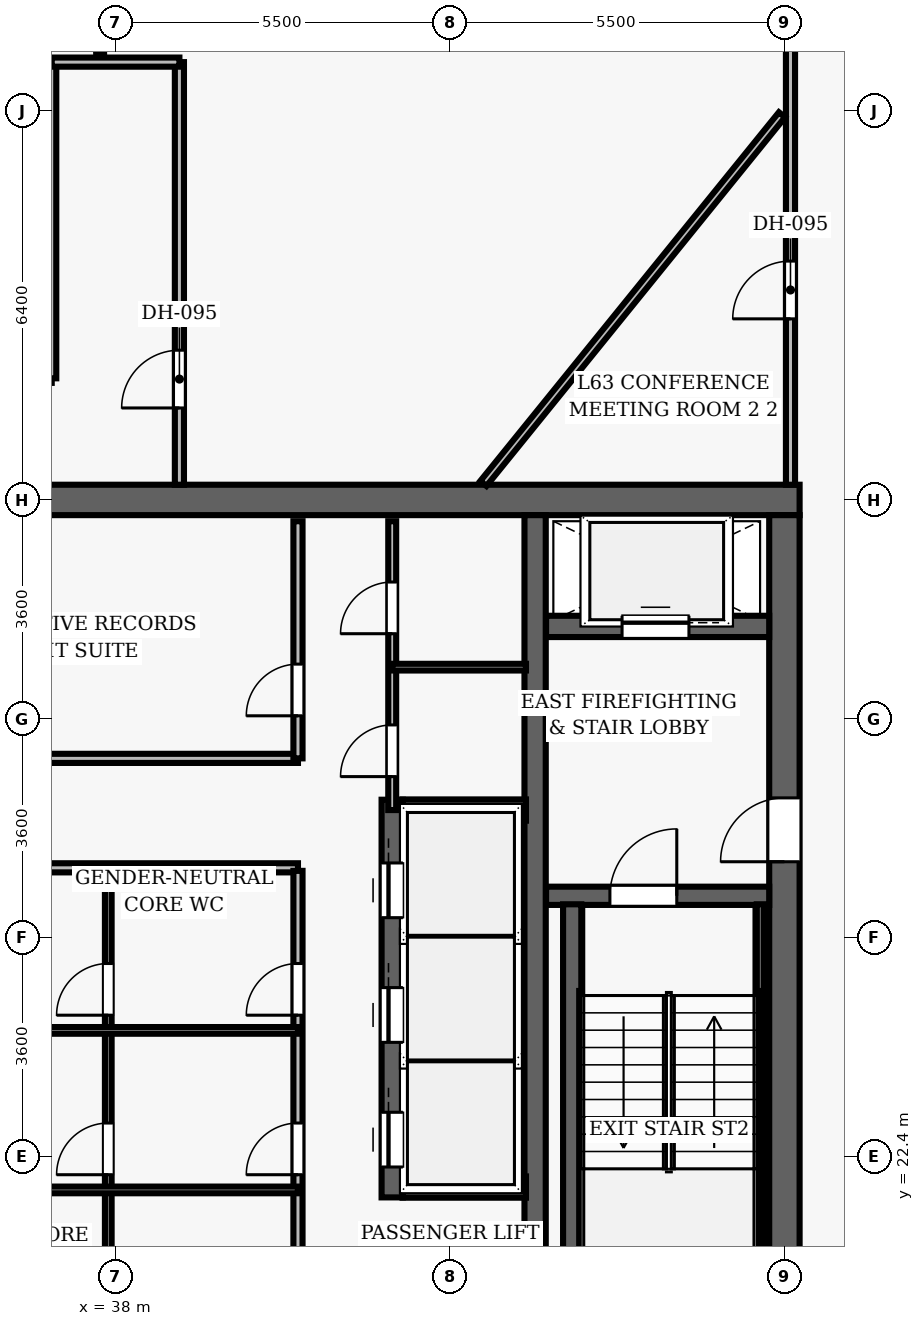
"""IFC4 building model, lengths in metres.
Left out: names, types, materials, properties, quantities, classifications, styles, units other than length and angle.
Written with IfcOpenShell. Run it as: python <this file> out.ifc"""

import sys

from ifc_helpers import new_model, si_unit, direction, frame, frame_2d, origin, place, context, subcontext, project, spatial, rectangle, extrude, element, fill, save


model = new_model("IFC4")
c1 = context("Model", 3, precision=1e-05, world=origin(), true_north=direction((0.0, 1.0)))
c2 = subcontext(c1, "Body", "Model", "MODEL_VIEW")
j1 = project(units=[si_unit("LENGTHUNIT", "METRE"), si_unit("PLANEANGLEUNIT", "RADIAN")], contexts=[c1])
p1 = place(None, origin())
s1 = spatial("IfcSite", under=j1, at=p1, CompositionType="ELEMENT")
p2 = place(p1, origin())
s2 = spatial("IfcBuilding", under=s1, at=p2, CompositionType="ELEMENT")
p3 = place(p2, frame((0.0, 0.0, 249.75)))
s3 = spatial("IfcBuildingStorey", under=s2, at=p3, CompositionType="ELEMENT", Elevation=249.75)
p4 = place(p3, frame((26.75, 33.2, 0.0), z_axis=(0.0, 0.0, 1.0), x_axis=(1.0, 0.0, 0.0)))
e1 = element("IfcWall", 1, at=p4, inside=s3, PredefinedType="SHEAR", context=c2, shape_type="SweptSolid", body=[
    extrude(rectangle(XDim=22.5, YDim=0.5, at=frame_2d((11.25, 0.0))), origin(), (0.0, 0.0, 1.0), 3.85),
])
p5 = place(p3, frame((49.0, 19.05, 0.0), z_axis=(0.0, 0.0, 1.0), x_axis=(0.0, 1.0, 0.0)))
e2 = element("IfcWall", 2, at=p5, inside=s3, PredefinedType="SHEAR", context=c2, shape_type="SweptSolid", body=[
    extrude(rectangle(XDim=13.9, YDim=0.5, at=frame_2d((6.95, 0.0))), origin(), (0.0, 0.0, 1.0), 3.85),
])
p6 = place(p5, frame((8.2, 0.0, 0.0)))
e3 = element("IfcOpeningElement", 3, at=p6, cuts=e2, PredefinedType="OPENING", context=c2, shape_type="SweptSolid", body=[
    extrude(rectangle(XDim=1.05, YDim=2.15, at=frame_2d((0.525, 1.075))), frame((0.0, 0.26, 0.0), z_axis=(0.0, -1.0, 0.0), x_axis=(1.0, 0.0, 0.0)), (0.0, 0.0, 1.0), 0.52),
])
p7 = place(p3, frame((44.9, 19.05, 0.0), z_axis=(0.0, 0.0, 1.0), x_axis=(0.0, 1.0, 0.0)))
e4 = element("IfcWall", 4, at=p7, inside=s3, PredefinedType="SHEAR", context=c2, shape_type="SweptSolid", body=[
    extrude(rectangle(XDim=13.9, YDim=0.35, at=frame_2d((6.95, 0.0))), origin(), (0.0, 0.0, 1.0), 3.85),
])
p8 = place(p3, frame((45.08, 26.69, 0.0), z_axis=(0.0, 0.0, 1.0), x_axis=(1.0, 0.0, 0.0)))
e5 = element("IfcWall", 5, at=p8, inside=s3, PredefinedType="SHEAR", context=c2, shape_type="SweptSolid", body=[
    extrude(rectangle(XDim=3.67, YDim=0.3, at=frame_2d((1.835, 0.0))), origin(), (0.0, 0.0, 1.0), 3.85),
])
p9 = place(p8, frame((1.05, 0.0, 0.0)))
e6 = element("IfcOpeningElement", 6, at=p9, cuts=e5, PredefinedType="OPENING", context=c2, shape_type="SweptSolid", body=[
    extrude(rectangle(XDim=1.1, YDim=2.15, at=frame_2d((0.55, 1.075))), frame((0.0, 0.16, 0.0), z_axis=(0.0, -1.0, 0.0), x_axis=(1.0, 0.0, 0.0)), (0.0, 0.0, 1.0), 0.32),
])
p10 = place(p3, frame((45.51, 19.05, 0.0), z_axis=(0.0, 0.0, 1.0), x_axis=(0.0, 1.0, 0.0)))
e7 = element("IfcWall", 7, at=p10, inside=s3, PredefinedType="SHEAR", context=c2, shape_type="SweptSolid", body=[
    extrude(rectangle(XDim=7.5, YDim=0.3, at=frame_2d((3.75, 0.0))), origin(), (0.0, 0.0, 1.0), 3.85),
])
p11 = place(p3, frame((48.605, 19.1, 0.0), z_axis=(0.0, 0.0, 1.0), x_axis=(0.0, 1.0, 0.0)))
e8 = element("IfcWall", 8, at=p11, inside=s3, PredefinedType="SHEAR", context=c2, shape_type="SweptSolid", body=[
    extrude(rectangle(XDim=7.45, YDim=0.12, at=frame_2d((3.725, 0.0))), origin(), (0.0, 0.0, 1.0), 3.85),
])
p12 = place(p3, frame((45.08, 31.12, 0.0), z_axis=(0.0, 0.0, 1.0), x_axis=(1.0, 0.0, 0.0)))
e9 = element("IfcWall", 9, at=p12, inside=s3, PredefinedType="SHEAR", context=c2, shape_type="SweptSolid", body=[
    extrude(rectangle(XDim=3.67, YDim=0.35, at=frame_2d((1.835, 0.0))), origin(), (0.0, 0.0, 1.0), 3.04),
])
p13 = place(p12, frame((1.25, 0.0, 0.0)))
e10 = element("IfcOpeningElement", 10, at=p13, cuts=e9, PredefinedType="OPENING", context=c2, shape_type="SweptSolid", body=[
    extrude(rectangle(XDim=1.1, YDim=2.15, at=frame_2d((0.55, 1.075))), frame((0.0, 0.185, 0.0), z_axis=(0.0, -1.0, 0.0), x_axis=(1.0, 0.0, 0.0)), (0.0, 0.0, 1.0), 0.37),
])
p14 = place(p3, frame((42.55, 21.73, 0.0), z_axis=(0.0, 0.0, 1.0), x_axis=(0.0, 1.0, 0.0)))
e11 = element("IfcWall", 11, at=p14, inside=s3, PredefinedType="SHEAR", context=c2, shape_type="SweptSolid", body=[
    extrude(rectangle(XDim=6.54, YDim=0.35, at=frame_2d((3.27, 0.0))), origin(), (0.0, 0.0, 1.0), 3.04),
])
p15 = place(p14, frame((0.5, 0.0, 0.0)))
e12 = element("IfcOpeningElement", 12, at=p15, cuts=e11, PredefinedType="OPENING", context=c2, shape_type="SweptSolid", body=[
    extrude(rectangle(XDim=0.9, YDim=2.15, at=frame_2d((0.45, 1.075))), frame((0.0, 0.185, 0.0), z_axis=(0.0, -1.0, 0.0), x_axis=(1.0, 0.0, 0.0)), (0.0, 0.0, 1.0), 0.37),
])
p16 = place(p14, frame((2.55, 0.0, 0.0)))
e13 = element("IfcOpeningElement", 13, at=p16, cuts=e11, PredefinedType="OPENING", context=c2, shape_type="SweptSolid", body=[
    extrude(rectangle(XDim=0.9, YDim=2.15, at=frame_2d((0.45, 1.075))), frame((0.0, 0.185, 0.0), z_axis=(0.0, -1.0, 0.0), x_axis=(1.0, 0.0, 0.0)), (0.0, 0.0, 1.0), 0.37),
])
p17 = place(p14, frame((4.6, 0.0, 0.0)))
e14 = element("IfcOpeningElement", 14, at=p17, cuts=e11, PredefinedType="OPENING", context=c2, shape_type="SweptSolid", body=[
    extrude(rectangle(XDim=0.9, YDim=2.15, at=frame_2d((0.45, 1.075))), frame((0.0, 0.185, 0.0), z_axis=(0.0, -1.0, 0.0), x_axis=(1.0, 0.0, 0.0)), (0.0, 0.0, 1.0), 0.37),
])
for number, where, z_axis, x_axis in (
    (15, (42.72, 21.9, 0.0), (0.0, 0.0, 1.0), (1.0, 0.0, 0.0)),
    (16, (42.72, 28.1, 0.0), (0.0, 0.0, 1.0), (1.0, 0.0, 0.0)),
):
    element("IfcWall", number, at=place(p3, frame(where, z_axis=z_axis, x_axis=x_axis)), inside=s3, PredefinedType="SHEAR", context=c2, shape_type="SweptSolid", body=[
        extrude(rectangle(XDim=2.03, YDim=0.35, at=frame_2d((1.015, 0.0))), origin(), (0.0, 0.0, 1.0), 3.04),
    ])
for number, where, z_axis, x_axis in (
    (17, (34.64, 27.15, 0.0), (0.0, 0.0, 1.0), (1.0, 0.0, 0.0)),
    (18, (34.64, 28.95, 0.0), (0.0, 0.0, 1.0), (1.0, 0.0, 0.0)),
):
    element("IfcWall", number, at=place(p3, frame(where, z_axis=z_axis, x_axis=x_axis)), inside=s3, PredefinedType="PARTITIONING", context=c2, shape_type="SweptSolid", body=[
        extrude(rectangle(XDim=6.36, YDim=0.15, at=frame_2d((3.18, 0.0))), origin(), (0.0, 0.0, 1.0), 3.04),
    ])
p18 = place(p3, frame((41.0, 28.95, 0.0), z_axis=(0.0, 0.0, 1.0), x_axis=(0.0, 1.0, 0.0)))
e19 = element("IfcWall", 19, at=p18, inside=s3, PredefinedType="PARTITIONING", context=c2, shape_type="SweptSolid", body=[
    extrude(rectangle(XDim=3.9, YDim=0.15, at=frame_2d((1.95, 0.0))), origin(), (0.0, 0.0, 1.0), 3.04),
])
p19 = place(p18, frame((0.7, 0.0, 0.0)))
e20 = element("IfcOpeningElement", 20, at=p19, cuts=e19, PredefinedType="OPENING", context=c2, shape_type="SweptSolid", body=[
    extrude(rectangle(XDim=0.85, YDim=2.1, at=frame_2d((0.425, 1.05))), frame((0.0, 0.085, 0.0), z_axis=(0.0, -1.0, 0.0), x_axis=(1.0, 0.0, 0.0)), (0.0, 0.0, 1.0), 0.17),
])
p20 = place(p3, frame((41.0, 19.15, 0.0), z_axis=(0.0, 0.0, 1.0), x_axis=(0.0, 1.0, 0.0)))
e21 = element("IfcWall", 21, at=p20, inside=s3, PredefinedType="PARTITIONING", context=c2, shape_type="SweptSolid", body=[
    extrude(rectangle(XDim=7.95, YDim=0.15, at=frame_2d((3.975, 0.0))), origin(), (0.0, 0.0, 1.0), 3.04),
])
p21 = place(p20, frame((0.25, 0.0, 0.0)))
e22 = element("IfcOpeningElement", 22, at=p21, cuts=e21, PredefinedType="OPENING", context=c2, shape_type="SweptSolid", body=[
    extrude(rectangle(XDim=0.85, YDim=2.1, at=frame_2d((0.425, 1.05))), frame((0.0, 0.085, 0.0), z_axis=(0.0, -1.0, 0.0), x_axis=(1.0, 0.0, 0.0)), (0.0, 0.0, 1.0), 0.17),
])
p22 = place(p20, frame((2.953, 0.0, 0.0)))
e23 = element("IfcOpeningElement", 23, at=p22, cuts=e21, PredefinedType="OPENING", context=c2, shape_type="SweptSolid", body=[
    extrude(rectangle(XDim=0.85, YDim=2.1, at=frame_2d((0.425, 1.05))), frame((0.0, 0.085, 0.0), z_axis=(0.0, -1.0, 0.0), x_axis=(1.0, 0.0, 0.0)), (0.0, 0.0, 1.0), 0.17),
])
p23 = place(p20, frame((5.576, 0.0, 0.0)))
e24 = element("IfcOpeningElement", 24, at=p23, cuts=e21, PredefinedType="OPENING", context=c2, shape_type="SweptSolid", body=[
    extrude(rectangle(XDim=0.85, YDim=2.1, at=frame_2d((0.425, 1.05))), frame((0.0, 0.085, 0.0), z_axis=(0.0, -1.0, 0.0), x_axis=(1.0, 0.0, 0.0)), (0.0, 0.0, 1.0), 0.17),
])
p24 = place(p3, frame((37.88, 19.15, 0.0), z_axis=(0.0, 0.0, 1.0), x_axis=(0.0, 1.0, 0.0)))
e25 = element("IfcWall", 25, at=p24, inside=s3, PredefinedType="PARTITIONING", context=c2, shape_type="SweptSolid", body=[
    extrude(rectangle(XDim=7.95, YDim=0.11, at=frame_2d((3.975, 0.0))), origin(), (0.0, 0.0, 1.0), 3.04),
])
p25 = place(p24, frame((0.25, 0.0, 0.0)))
e26 = element("IfcOpeningElement", 26, at=p25, cuts=e25, PredefinedType="OPENING", context=c2, shape_type="SweptSolid", body=[
    extrude(rectangle(XDim=0.85, YDim=2.1, at=frame_2d((0.425, 1.05))), frame((0.0, 0.065, 0.0), z_axis=(0.0, -1.0, 0.0), x_axis=(1.0, 0.0, 0.0)), (0.0, 0.0, 1.0), 0.13),
])
p26 = place(p24, frame((2.953, 0.0, 0.0)))
e27 = element("IfcOpeningElement", 27, at=p26, cuts=e25, PredefinedType="OPENING", context=c2, shape_type="SweptSolid", body=[
    extrude(rectangle(XDim=0.85, YDim=2.1, at=frame_2d((0.425, 1.05))), frame((0.0, 0.065, 0.0), z_axis=(0.0, -1.0, 0.0), x_axis=(1.0, 0.0, 0.0)), (0.0, 0.0, 1.0), 0.13),
])
p27 = place(p24, frame((5.576, 0.0, 0.0)))
e28 = element("IfcOpeningElement", 28, at=p27, cuts=e25, PredefinedType="OPENING", context=c2, shape_type="SweptSolid", body=[
    extrude(rectangle(XDim=0.85, YDim=2.1, at=frame_2d((0.425, 1.05))), frame((0.0, 0.065, 0.0), z_axis=(0.0, -1.0, 0.0), x_axis=(1.0, 0.0, 0.0)), (0.0, 0.0, 1.0), 0.13),
])
for number, where, z_axis, x_axis in (
    (29, (34.75, 21.853, 0.0), (0.0, 0.0, 1.0), (1.0, 0.0, 0.0)),
    (30, (34.75, 24.477, 0.0), (0.0, 0.0, 1.0), (1.0, 0.0, 0.0)),
):
    element("IfcWall", number, at=place(p3, frame(where, z_axis=z_axis, x_axis=x_axis)), inside=s3, PredefinedType="PARTITIONING", context=c2, shape_type="SweptSolid", body=[
        extrude(rectangle(XDim=6.25, YDim=0.11, at=frame_2d((3.125, 0.0))), origin(), (0.0, 0.0, 1.0), 3.04),
    ])
p28 = place(p3, frame((42.55, 28.1, 0.0), z_axis=(0.0, 0.0, 1.0), x_axis=(0.0, 1.0, 0.0)))
e31 = element("IfcWall", 31, at=p28, inside=s3, PredefinedType="PARTITIONING", context=c2, shape_type="SweptSolid", body=[
    extrude(rectangle(XDim=4.75, YDim=0.13, at=frame_2d((2.375, 0.0))), origin(), (0.0, 0.0, 1.0), 3.04),
])
p29 = place(p28, frame((0.55, 0.0, 0.0)))
e32 = element("IfcOpeningElement", 32, at=p29, cuts=e31, PredefinedType="OPENING", context=c2, shape_type="SweptSolid", body=[
    extrude(rectangle(XDim=0.85, YDim=2.1, at=frame_2d((0.425, 1.05))), frame((0.0, 0.075, 0.0), z_axis=(0.0, -1.0, 0.0), x_axis=(1.0, 0.0, 0.0)), (0.0, 0.0, 1.0), 0.15),
])
p30 = place(p28, frame((2.9, 0.0, 0.0)))
e33 = element("IfcOpeningElement", 33, at=p30, cuts=e31, PredefinedType="OPENING", context=c2, shape_type="SweptSolid", body=[
    extrude(rectangle(XDim=0.85, YDim=2.1, at=frame_2d((0.425, 1.05))), frame((0.0, 0.075, 0.0), z_axis=(0.0, -1.0, 0.0), x_axis=(1.0, 0.0, 0.0)), (0.0, 0.0, 1.0), 0.15),
])
p31 = place(p3, frame((42.55, 30.45, 0.0), z_axis=(0.0, 0.0, 1.0), x_axis=(1.0, 0.0, 0.0)))
e34 = element("IfcWall", 34, at=p31, inside=s3, PredefinedType="PARTITIONING", context=c2, shape_type="SweptSolid", body=[
    extrude(rectangle(XDim=2.2, YDim=0.11, at=frame_2d((1.1, 0.0))), origin(), (0.0, 0.0, 1.0), 3.04),
])
p32 = place(p3, frame((49.1, 33.45, 0.0), z_axis=(0.0, 0.0, 1.0), x_axis=(0.0, 1.0, 0.0)))
e35 = element("IfcWall", 35, at=p32, inside=s3, PredefinedType="PARTITIONING", context=c2, shape_type="SweptSolid", body=[
    extrude(rectangle(XDim=7.95, YDim=0.15, at=frame_2d((3.975, 0.0))), origin(), (0.0, 0.0, 1.0), 3.04),
])
p33 = place(p32, frame((2.728, 0.0, 0.0)))
e36 = element("IfcOpeningElement", 36, at=p33, cuts=e35, PredefinedType="OPENING", context=c2, shape_type="SweptSolid", body=[
    extrude(rectangle(XDim=0.95, YDim=2.15, at=frame_2d((0.475, 1.075))), frame((0.0, 0.085, 0.0), z_axis=(0.0, -1.0, 0.0), x_axis=(1.0, 0.0, 0.0)), (0.0, 0.0, 1.0), 0.17),
])
p34 = place(p3, frame((36.95, 35.2, 0.0), z_axis=(0.0, 0.0, 1.0), x_axis=(0.0, 1.0, 0.0)))
e37 = element("IfcWall", 37, at=p34, inside=s3, PredefinedType="PARTITIONING", context=c2, shape_type="SweptSolid", body=[
    extrude(rectangle(XDim=5.2, YDim=0.15, at=frame_2d((2.6, 0.0))), origin(), (0.0, 0.0, 1.0), 3.04),
])
p35 = place(p3, frame((39.05, 33.45, 0.0), z_axis=(0.0, 0.0, 1.0), x_axis=(0.0, 1.0, 0.0)))
e38 = element("IfcWall", 38, at=p35, inside=s3, PredefinedType="PARTITIONING", context=c2, shape_type="SweptSolid", body=[
    extrude(rectangle(XDim=6.95, YDim=0.15, at=frame_2d((3.475, 0.0))), origin(), (0.0, 0.0, 1.0), 3.04),
])
p36 = place(p35, frame((1.262, 0.0, 0.0)))
e39 = element("IfcOpeningElement", 39, at=p36, cuts=e38, PredefinedType="OPENING", context=c2, shape_type="SweptSolid", body=[
    extrude(rectangle(XDim=0.95, YDim=2.15, at=frame_2d((0.475, 1.075))), frame((0.0, 0.085, 0.0), z_axis=(0.0, -1.0, 0.0), x_axis=(1.0, 0.0, 0.0)), (0.0, 0.0, 1.0), 0.17),
])
p37 = place(p3, frame((36.95, 40.4, 0.0), z_axis=(0.0, 0.0, 1.0), x_axis=(1.0, 0.0, 0.0)))
e40 = element("IfcWall", 40, at=p37, inside=s3, PredefinedType="PARTITIONING", context=c2, shape_type="SweptSolid", body=[
    extrude(rectangle(XDim=2.1, YDim=0.15, at=frame_2d((1.05, 0.0))), origin(), (0.0, 0.0, 1.0), 3.04),
])
p38 = place(p3, frame((44.049, 33.47, 0.0), z_axis=(0.0, 0.0, 1.0), x_axis=(0.629319722443, 0.777146502883, 0.0)))
e41 = element("IfcWall", 41, at=p38, inside=s3, PredefinedType="PARTITIONING", context=c2, shape_type="SweptSolid", body=[
    extrude(rectangle(XDim=7.803, YDim=0.13, at=frame_2d((3.902, 0.0))), origin(), (0.0, 0.0, 1.0), 3.04),
])
p39 = place(p3, frame((37.746, 40.54, 0.0), z_axis=(0.0, 0.0, 1.0), x_axis=(-0.017434428184, 0.999848008806, 0.0)))
e42 = element("IfcWall", 42, at=p39, inside=s3, PredefinedType="PARTITIONING", context=c2, shape_type="SweptSolid", body=[
    extrude(rectangle(XDim=8.906, YDim=0.13, at=frame_2d((4.453, 0.0))), origin(), (0.0, 0.0, 1.0), 3.04),
])
p40 = place(p3, frame((49.4, 43.694, 0.0), z_axis=(0.0, 0.0, 1.0), x_axis=(0.691260013962, -0.722606111998, 0.0)))
e43 = element("IfcWall", 43, at=p40, inside=s3, PredefinedType="SOLIDWALL", context=c2, shape_type="SweptSolid", body=[
    extrude(rectangle(XDim=6.527, YDim=0.28, at=frame_2d((3.263, 0.0))), origin(), (0.0, 0.0, 1.0), 3.625),
])
p41 = place(p9, origin())
e44 = element("IfcDoor", 44, at=p41, inside=s3, OperationType="SINGLE_SWING_RIGHT", PredefinedType="DOOR", context=c2, shape_type="SweptSolid", body=[
    extrude(rectangle(XDim=1.1, YDim=2.15, at=frame_2d((0.55, 1.075))), frame((0.0, 0.025, 0.0), z_axis=(0.0, -1.0, 0.0), x_axis=(1.0, 0.0, 0.0)), (0.0, 0.0, 1.0), 0.05),
])
fill(e6, e44)
p42 = place(p6, origin())
e45 = element("IfcDoor", 45, at=p42, inside=s3, OperationType="SINGLE_SWING_LEFT", PredefinedType="DOOR", context=c2, shape_type="SweptSolid", body=[
    extrude(rectangle(XDim=1.05, YDim=2.15, at=frame_2d((0.525, 1.075))), frame((0.0, 0.025, 0.0), z_axis=(0.0, -1.0, 0.0), x_axis=(1.0, 0.0, 0.0)), (0.0, 0.0, 1.0), 0.05),
])
fill(e3, e45)
p43 = place(p19, origin())
e46 = element("IfcDoor", 46, at=p43, inside=s3, OperationType="SINGLE_SWING_LEFT", PredefinedType="DOOR", context=c2, shape_type="SweptSolid", body=[
    extrude(rectangle(XDim=0.85, YDim=2.1, at=frame_2d((0.425, 1.05))), frame((0.0, 0.025, 0.0), z_axis=(0.0, -1.0, 0.0), x_axis=(1.0, 0.0, 0.0)), (0.0, 0.0, 1.0), 0.05),
])
fill(e20, e46)
p44 = place(p22, origin())
e47 = element("IfcDoor", 47, at=p44, inside=s3, OperationType="SINGLE_SWING_LEFT", PredefinedType="DOOR", context=c2, shape_type="SweptSolid", body=[
    extrude(rectangle(XDim=0.85, YDim=2.1, at=frame_2d((0.425, 1.05))), frame((0.0, 0.025, 0.0), z_axis=(0.0, -1.0, 0.0), x_axis=(1.0, 0.0, 0.0)), (0.0, 0.0, 1.0), 0.05),
])
fill(e23, e47)
p45 = place(p26, origin())
e48 = element("IfcDoor", 48, at=p45, inside=s3, OperationType="SINGLE_SWING_LEFT", PredefinedType="DOOR", context=c2, shape_type="SweptSolid", body=[
    extrude(rectangle(XDim=0.85, YDim=2.1, at=frame_2d((0.425, 1.05))), frame((0.0, 0.025, 0.0), z_axis=(0.0, -1.0, 0.0), x_axis=(1.0, 0.0, 0.0)), (0.0, 0.0, 1.0), 0.05),
])
fill(e27, e48)
p46 = place(p23, origin())
e49 = element("IfcDoor", 49, at=p46, inside=s3, OperationType="SINGLE_SWING_LEFT", PredefinedType="DOOR", context=c2, shape_type="SweptSolid", body=[
    extrude(rectangle(XDim=0.85, YDim=2.1, at=frame_2d((0.425, 1.05))), frame((0.0, 0.025, 0.0), z_axis=(0.0, -1.0, 0.0), x_axis=(1.0, 0.0, 0.0)), (0.0, 0.0, 1.0), 0.05),
])
fill(e24, e49)
p47 = place(p27, origin())
e50 = element("IfcDoor", 50, at=p47, inside=s3, OperationType="SINGLE_SWING_LEFT", PredefinedType="DOOR", context=c2, shape_type="SweptSolid", body=[
    extrude(rectangle(XDim=0.85, YDim=2.1, at=frame_2d((0.425, 1.05))), frame((0.0, 0.025, 0.0), z_axis=(0.0, -1.0, 0.0), x_axis=(1.0, 0.0, 0.0)), (0.0, 0.0, 1.0), 0.05),
])
fill(e28, e50)
p48 = place(p29, origin())
e51 = element("IfcDoor", 51, at=p48, inside=s3, OperationType="SINGLE_SWING_LEFT", PredefinedType="DOOR", context=c2, shape_type="SweptSolid", body=[
    extrude(rectangle(XDim=0.85, YDim=2.1, at=frame_2d((0.425, 1.05))), frame((0.0, 0.025, 0.0), z_axis=(0.0, -1.0, 0.0), x_axis=(1.0, 0.0, 0.0)), (0.0, 0.0, 1.0), 0.05),
])
fill(e32, e51)
p49 = place(p30, origin())
e52 = element("IfcDoor", 52, at=p49, inside=s3, OperationType="SINGLE_SWING_LEFT", PredefinedType="DOOR", context=c2, shape_type="SweptSolid", body=[
    extrude(rectangle(XDim=0.85, YDim=2.1, at=frame_2d((0.425, 1.05))), frame((0.0, 0.025, 0.0), z_axis=(0.0, -1.0, 0.0), x_axis=(1.0, 0.0, 0.0)), (0.0, 0.0, 1.0), 0.05),
])
fill(e33, e52)
p50 = place(p33, origin())
e53 = element("IfcDoor", 53, at=p50, inside=s3, OperationType="SINGLE_SWING_LEFT", PredefinedType="DOOR", context=c2, shape_type="SweptSolid", body=[
    extrude(rectangle(XDim=0.95, YDim=2.15, at=frame_2d((0.475, 1.075))), frame((0.0, 0.025, 0.0), z_axis=(0.0, -1.0, 0.0), x_axis=(1.0, 0.0, 0.0)), (0.0, 0.0, 1.0), 0.05),
])
fill(e36, e53)
p51 = place(p36, origin())
e54 = element("IfcDoor", 54, at=p51, inside=s3, OperationType="SINGLE_SWING_LEFT", PredefinedType="DOOR", context=c2, shape_type="SweptSolid", body=[
    extrude(rectangle(XDim=0.95, YDim=2.15, at=frame_2d((0.475, 1.075))), frame((0.0, 0.025, 0.0), z_axis=(0.0, -1.0, 0.0), x_axis=(1.0, 0.0, 0.0)), (0.0, 0.0, 1.0), 0.05),
])
fill(e39, e54)
p52 = place(p15, origin())
e55 = element("IfcDoor", 55, at=p52, inside=s3, OperationType="SLIDING_TO_LEFT", PredefinedType="DOOR", context=c2, shape_type="SweptSolid", body=[
    extrude(rectangle(XDim=0.9, YDim=2.15, at=frame_2d((0.45, 1.075))), frame((0.0, 0.025, 0.0), z_axis=(0.0, -1.0, 0.0), x_axis=(1.0, 0.0, 0.0)), (0.0, 0.0, 1.0), 0.05),
])
fill(e12, e55)
p53 = place(p16, origin())
e56 = element("IfcDoor", 56, at=p53, inside=s3, OperationType="SLIDING_TO_LEFT", PredefinedType="DOOR", context=c2, shape_type="SweptSolid", body=[
    extrude(rectangle(XDim=0.9, YDim=2.15, at=frame_2d((0.45, 1.075))), frame((0.0, 0.025, 0.0), z_axis=(0.0, -1.0, 0.0), x_axis=(1.0, 0.0, 0.0)), (0.0, 0.0, 1.0), 0.05),
])
fill(e13, e56)
p54 = place(p17, origin())
e57 = element("IfcDoor", 57, at=p54, inside=s3, OperationType="SLIDING_TO_LEFT", PredefinedType="DOOR", context=c2, shape_type="SweptSolid", body=[
    extrude(rectangle(XDim=0.9, YDim=2.15, at=frame_2d((0.45, 1.075))), frame((0.0, 0.025, 0.0), z_axis=(0.0, -1.0, 0.0), x_axis=(1.0, 0.0, 0.0)), (0.0, 0.0, 1.0), 0.05),
])
fill(e14, e57)
p55 = place(p13, origin())
e58 = element("IfcDoor", 58, at=p55, inside=s3, OperationType="SLIDING_TO_LEFT", PredefinedType="DOOR", context=c2, shape_type="SweptSolid", body=[
    extrude(rectangle(XDim=1.1, YDim=2.15, at=frame_2d((0.55, 1.075))), frame((0.0, 0.025, 0.0), z_axis=(0.0, -1.0, 0.0), x_axis=(1.0, 0.0, 0.0)), (0.0, 0.0, 1.0), 0.05),
])
fill(e10, e58)
save(model, sys.argv[1])
